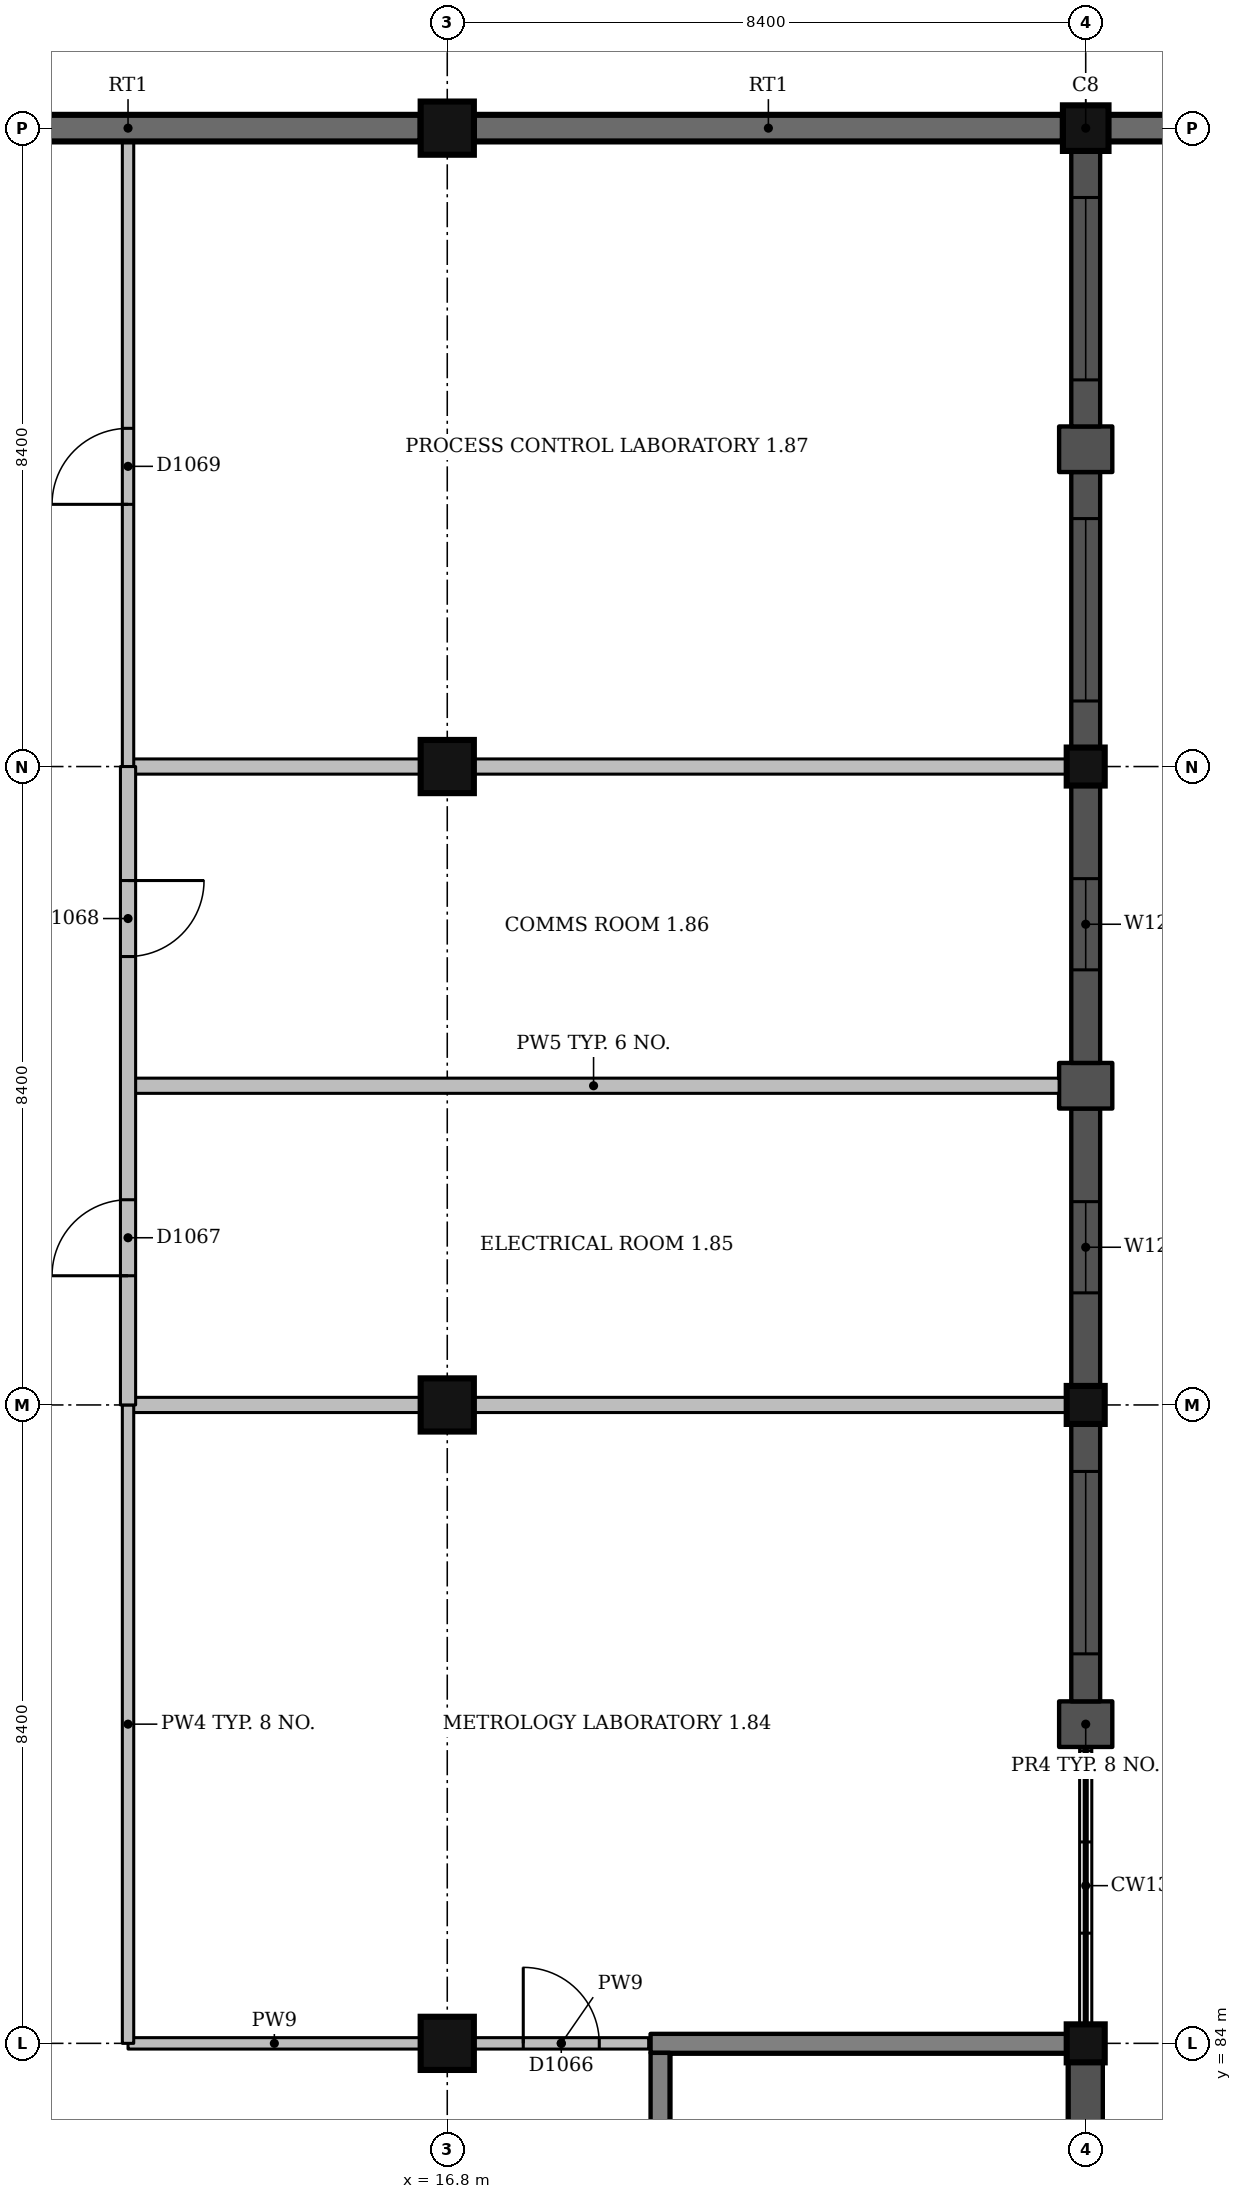
"""IFC4 building model, lengths in metres.
Left out: names, types, materials, properties, quantities, classifications, styles, units other than length and angle.
Written with IfcOpenShell. Run it as: python <this file> out.ifc"""

import sys

from ifc_helpers import new_model, si_unit, direction, frame, frame_2d, origin, origin_2d, place, context, subcontext, project, spatial, rectangle, extrude, element, fill, save


model = new_model("IFC4")
c1 = context("Model", 3, precision=1e-05, world=origin(), true_north=direction((0.0, 1.0)))
c2 = subcontext(c1, "Body", "Model", "MODEL_VIEW")
j1 = project(units=[si_unit("LENGTHUNIT", "METRE"), si_unit("PLANEANGLEUNIT", "RADIAN")], contexts=[c1])
p1 = place(None, origin())
s1 = spatial("IfcSite", under=j1, at=p1, CompositionType="ELEMENT")
p2 = place(p1, origin())
s2 = spatial("IfcBuilding", under=s1, at=p2, CompositionType="ELEMENT")
p3 = place(p2, frame((0.0, 0.0, 4.5)))
s3 = spatial("IfcBuildingStorey", under=s2, at=p3, CompositionType="ELEMENT", Elevation=4.5)
for number, where, z_axis, x_axis in (
    (1, (16.8, 84.0, -1.5), (0.0, 0.0, 1.0), (1.0, 0.0, 0.0)),
    (2, (16.8, 92.4, -1.5), (0.0, 0.0, 1.0), (1.0, 0.0, 0.0)),
    (3, (16.8, 100.8, -1.5), (0.0, 0.0, 1.0), (1.0, 0.0, 0.0)),
):
    element("IfcColumn", number, at=place(p3, frame(where, z_axis=z_axis, x_axis=x_axis)), inside=s3, PredefinedType="COLUMN", context=c2, shape_type="SweptSolid", body=[
        extrude(rectangle(XDim=0.7, YDim=0.7, at=origin_2d()), origin(), (0.0, 0.0, 1.0), 6.0),
    ])
p4 = place(p3, frame((16.8, 109.2, -0.25), z_axis=(0.0, 0.0, 1.0), x_axis=(1.0, 0.0, 0.0)))
e4 = element("IfcColumn", 4, at=p4, inside=s3, PredefinedType="COLUMN", context=c2, shape_type="SweptSolid", body=[
    extrude(rectangle(XDim=0.7, YDim=0.7, at=origin_2d()), origin(), (0.0, 0.0, 1.0), 4.75),
])
for number, where, z_axis, x_axis in (
    (5, (25.2, 84.0, -1.5), (0.0, 0.0, 1.0), (1.0, 0.0, 0.0)),
    (6, (25.2, 92.4, -1.5), (0.0, 0.0, 1.0), (1.0, 0.0, 0.0)),
    (7, (25.2, 100.8, -1.5), (0.0, 0.0, 1.0), (1.0, 0.0, 0.0)),
):
    element("IfcColumn", number, at=place(p3, frame(where, z_axis=z_axis, x_axis=x_axis)), inside=s3, PredefinedType="COLUMN", context=c2, shape_type="SweptSolid", body=[
        extrude(rectangle(XDim=0.5, YDim=0.5, at=origin_2d()), origin(), (0.0, 0.0, 1.0), 6.0),
    ])
p5 = place(p3, frame((25.2, 109.2, -0.25), z_axis=(0.0, 0.0, 1.0), x_axis=(1.0, 0.0, 0.0)))
e8 = element("IfcColumn", 8, at=p5, inside=s3, PredefinedType="COLUMN", context=c2, shape_type="SweptSolid", body=[
    extrude(rectangle(XDim=0.6, YDim=0.6, at=origin_2d()), origin(), (0.0, 0.0, 1.0), 4.75),
])
p6 = place(p3, frame((19.475, 84.0, 0.0), z_axis=(0.0, 0.0, 1.0), x_axis=(1.0, 0.0, 0.0)))
e9 = element("IfcWall", 9, at=p6, inside=s3, PredefinedType="SHEAR", context=c2, shape_type="SweptSolid", body=[
    extrude(rectangle(XDim=5.475, YDim=0.25, at=frame_2d((2.737, 0.0))), origin(), (0.0, 0.0, 1.0), 4.5),
])
p7 = place(p3, frame((19.6, 75.725, 0.0), z_axis=(0.0, 0.0, 1.0), x_axis=(0.0, 1.0, 0.0)))
e10 = element("IfcWall", 10, at=p7, inside=s3, PredefinedType="SHEAR", context=c2, shape_type="SweptSolid", body=[
    extrude(rectangle(XDim=8.15, YDim=0.25, at=frame_2d((4.075, 0.0))), origin(), (0.0, 0.0, 1.0), 4.5),
])
p8 = place(p3, frame((24.9, 109.2, -0.25), z_axis=(0.0, 0.0, 1.0), x_axis=(-1.0, 0.0, 0.0)))
e11 = element("IfcWall", 11, at=p8, inside=s3, PredefinedType="SOLIDWALL", context=c2, shape_type="SweptSolid", body=[
    extrude(rectangle(XDim=7.75, YDim=0.35, at=frame_2d((3.875, 0.0))), origin(), (0.0, 0.0, 1.0), 3.6),
])
p9 = place(p3, frame((16.45, 109.2, -0.25), z_axis=(0.0, 0.0, 1.0), x_axis=(-1.0, 0.0, 0.0)))
e12 = element("IfcWall", 12, at=p9, inside=s3, PredefinedType="SOLIDWALL", context=c2, shape_type="SweptSolid", body=[
    extrude(rectangle(XDim=7.7, YDim=0.35, at=frame_2d((3.85, 0.0))), origin(), (0.0, 0.0, 1.0), 3.6),
])
p10 = place(p3, frame((25.2, 109.2, 0.0), z_axis=(0.0, 0.0, 1.0), x_axis=(1.0, 0.0, 0.0)))
e13 = element("IfcWall", 13, at=p10, inside=s3, PredefinedType="SOLIDWALL", context=c2, shape_type="SweptSolid", body=[
    extrude(rectangle(XDim=67.2, YDim=0.35, at=frame_2d((33.6, 0.0))), origin(), (0.0, 0.0, 1.0), 4.25),
])
p11 = place(p3, frame((25.2, 80.1, 0.0), z_axis=(0.0, 0.0, 1.0), x_axis=(0.0, 1.0, 0.0)))
e14 = element("IfcWall", 14, at=p11, inside=s3, PredefinedType="SOLIDWALL", context=c2, shape_type="SweptSolid", body=[
    extrude(rectangle(XDim=3.65, YDim=0.45, at=frame_2d((1.825, 0.0))), origin(), (0.0, 0.0, 1.0), 3.65),
])
p12 = place(p3, frame((25.2, 87.9, 0.0), z_axis=(0.0, 0.0, 1.0), x_axis=(0.0, 1.0, 0.0)))
e15 = element("IfcWall", 15, at=p12, inside=s3, PredefinedType="SOLIDWALL", context=c2, shape_type="SweptSolid", body=[
    extrude(rectangle(XDim=0.6, YDim=0.7, at=frame_2d((0.3, 0.0))), origin(), (0.0, 0.0, 1.0), 3.35),
])
p13 = place(p3, frame((25.2, 88.5, 0.0), z_axis=(0.0, 0.0, 1.0), x_axis=(0.0, 1.0, 0.0)))
e16 = element("IfcWall", 16, at=p13, inside=s3, PredefinedType="SOLIDWALL", context=c2, shape_type="SweptSolid", body=[
    extrude(rectangle(XDim=3.65, YDim=0.38, at=frame_2d((1.825, 0.0))), origin(), (0.0, 0.0, 1.0), 3.35),
])
p14 = place(p13, frame((0.625, 0.0, 1.2)))
e17 = element("IfcOpeningElement", 17, at=p14, cuts=e16, PredefinedType="OPENING", context=c2, shape_type="SweptSolid", body=[
    extrude(rectangle(XDim=2.4, YDim=1.5, at=frame_2d((1.2, 0.75))), frame((0.0, 0.2, 0.0), z_axis=(0.0, -1.0, 0.0), x_axis=(1.0, 0.0, 0.0)), (0.0, 0.0, 1.0), 0.4),
])
p15 = place(p3, frame((25.2, 92.65, 0.0), z_axis=(0.0, 0.0, 1.0), x_axis=(0.0, 1.0, 0.0)))
e18 = element("IfcWall", 18, at=p15, inside=s3, PredefinedType="SOLIDWALL", context=c2, shape_type="SweptSolid", body=[
    extrude(rectangle(XDim=3.65, YDim=0.38, at=frame_2d((1.825, 0.0))), origin(), (0.0, 0.0, 1.0), 3.35),
])
p16 = place(p15, frame((1.225, 0.0, 2.4)))
e19 = element("IfcOpeningElement", 19, at=p16, cuts=e18, PredefinedType="OPENING", context=c2, shape_type="SweptSolid", body=[
    extrude(rectangle(XDim=1.2, YDim=0.6, at=frame_2d((0.6, 0.3))), frame((0.0, 0.2, 0.0), z_axis=(0.0, -1.0, 0.0), x_axis=(1.0, 0.0, 0.0)), (0.0, 0.0, 1.0), 0.4),
])
p17 = place(p3, frame((25.2, 96.3, 0.0), z_axis=(0.0, 0.0, 1.0), x_axis=(0.0, 1.0, 0.0)))
e20 = element("IfcWall", 20, at=p17, inside=s3, PredefinedType="SOLIDWALL", context=c2, shape_type="SweptSolid", body=[
    extrude(rectangle(XDim=0.6, YDim=0.7, at=frame_2d((0.3, 0.0))), origin(), (0.0, 0.0, 1.0), 3.35),
])
p18 = place(p3, frame((25.2, 96.9, 0.0), z_axis=(0.0, 0.0, 1.0), x_axis=(0.0, 1.0, 0.0)))
e21 = element("IfcWall", 21, at=p18, inside=s3, PredefinedType="SOLIDWALL", context=c2, shape_type="SweptSolid", body=[
    extrude(rectangle(XDim=3.65, YDim=0.38, at=frame_2d((1.825, 0.0))), origin(), (0.0, 0.0, 1.0), 3.35),
])
p19 = place(p18, frame((1.225, 0.0, 2.4)))
e22 = element("IfcOpeningElement", 22, at=p19, cuts=e21, PredefinedType="OPENING", context=c2, shape_type="SweptSolid", body=[
    extrude(rectangle(XDim=1.2, YDim=0.6, at=frame_2d((0.6, 0.3))), frame((0.0, 0.2, 0.0), z_axis=(0.0, -1.0, 0.0), x_axis=(1.0, 0.0, 0.0)), (0.0, 0.0, 1.0), 0.4),
])
p20 = place(p3, frame((25.2, 101.05, 0.0), z_axis=(0.0, 0.0, 1.0), x_axis=(0.0, 1.0, 0.0)))
e23 = element("IfcWall", 23, at=p20, inside=s3, PredefinedType="SOLIDWALL", context=c2, shape_type="SweptSolid", body=[
    extrude(rectangle(XDim=3.625, YDim=0.38, at=frame_2d((1.812, 0.0))), origin(), (0.0, 0.0, 1.0), 3.35),
])
p21 = place(p20, frame((0.613, 0.0, 1.2)))
e24 = element("IfcOpeningElement", 24, at=p21, cuts=e23, PredefinedType="OPENING", context=c2, shape_type="SweptSolid", body=[
    extrude(rectangle(XDim=2.4, YDim=1.5, at=frame_2d((1.2, 0.75))), frame((0.0, 0.2, 0.0), z_axis=(0.0, -1.0, 0.0), x_axis=(1.0, 0.0, 0.0)), (0.0, 0.0, 1.0), 0.4),
])
p22 = place(p3, frame((25.2, 104.675, 0.0), z_axis=(0.0, 0.0, 1.0), x_axis=(0.0, 1.0, 0.0)))
e25 = element("IfcWall", 25, at=p22, inside=s3, PredefinedType="SOLIDWALL", context=c2, shape_type="SweptSolid", body=[
    extrude(rectangle(XDim=0.6, YDim=0.7, at=frame_2d((0.3, 0.0))), origin(), (0.0, 0.0, 1.0), 3.35),
])
p23 = place(p3, frame((25.2, 105.275, 0.0), z_axis=(0.0, 0.0, 1.0), x_axis=(0.0, 1.0, 0.0)))
e26 = element("IfcWall", 26, at=p23, inside=s3, PredefinedType="SOLIDWALL", context=c2, shape_type="SweptSolid", body=[
    extrude(rectangle(XDim=3.625, YDim=0.38, at=frame_2d((1.812, 0.0))), origin(), (0.0, 0.0, 1.0), 3.35),
])
p24 = place(p23, frame((0.613, 0.0, 1.2)))
e27 = element("IfcOpeningElement", 27, at=p24, cuts=e26, PredefinedType="OPENING", context=c2, shape_type="SweptSolid", body=[
    extrude(rectangle(XDim=2.4, YDim=1.5, at=frame_2d((1.2, 0.75))), frame((0.0, 0.2, 0.0), z_axis=(0.0, -1.0, 0.0), x_axis=(1.0, 0.0, 0.0)), (0.0, 0.0, 1.0), 0.4),
])
p25 = place(p3, frame((12.6, 84.0, 0.0), z_axis=(0.0, 0.0, 1.0), x_axis=(1.0, 0.0, 0.0)))
e28 = element("IfcWall", 28, at=p25, inside=s3, PredefinedType="PARTITIONING", context=c2, shape_type="SweptSolid", body=[
    extrude(rectangle(XDim=3.85, YDim=0.15, at=frame_2d((1.925, 0.0))), origin(), (0.0, 0.0, 1.0), 3.4),
])
p26 = place(p3, frame((17.15, 84.0, 0.0), z_axis=(0.0, 0.0, 1.0), x_axis=(1.0, 0.0, 0.0)))
e29 = element("IfcWall", 29, at=p26, inside=s3, PredefinedType="PARTITIONING", context=c2, shape_type="SweptSolid", body=[
    extrude(rectangle(XDim=2.3, YDim=0.15, at=frame_2d((1.15, 0.0))), origin(), (0.0, 0.0, 1.0), 3.5),
])
p27 = place(p26, frame((0.65, 0.0, 0.0)))
e30 = element("IfcOpeningElement", 30, at=p27, cuts=e29, PredefinedType="OPENING", context=c2, shape_type="SweptSolid", body=[
    extrude(rectangle(XDim=1.0, YDim=2.1, at=frame_2d((0.5, 1.05))), frame((0.0, 0.085, 0.0), z_axis=(0.0, -1.0, 0.0), x_axis=(1.0, 0.0, 0.0)), (0.0, 0.0, 1.0), 0.17),
])
p28 = place(p3, frame((12.6, 92.4, 0.0), z_axis=(0.0, 0.0, 1.0), x_axis=(1.0, 0.0, 0.0)))
e31 = element("IfcWall", 31, at=p28, inside=s3, PredefinedType="PARTITIONING", context=c2, shape_type="SweptSolid", body=[
    extrude(rectangle(XDim=3.85, YDim=0.2, at=frame_2d((1.925, 0.0))), origin(), (0.0, 0.0, 1.0), 3.4),
])
p29 = place(p3, frame((17.15, 92.4, 0.0), z_axis=(0.0, 0.0, 1.0), x_axis=(1.0, 0.0, 0.0)))
e32 = element("IfcWall", 32, at=p29, inside=s3, PredefinedType="PARTITIONING", context=c2, shape_type="SweptSolid", body=[
    extrude(rectangle(XDim=7.8, YDim=0.2, at=frame_2d((3.9, 0.0))), origin(), (0.0, 0.0, 1.0), 3.4),
])
p30 = place(p3, frame((12.6, 96.6, 0.0), z_axis=(0.0, 0.0, 1.0), x_axis=(1.0, 0.0, 0.0)))
e33 = element("IfcWall", 33, at=p30, inside=s3, PredefinedType="PARTITIONING", context=c2, shape_type="SweptSolid", body=[
    extrude(rectangle(XDim=12.25, YDim=0.2, at=frame_2d((6.125, 0.0))), origin(), (0.0, 0.0, 1.0), 3.4),
])
p31 = place(p3, frame((12.6, 100.8, 0.0), z_axis=(0.0, 0.0, 1.0), x_axis=(1.0, 0.0, 0.0)))
e34 = element("IfcWall", 34, at=p31, inside=s3, PredefinedType="PARTITIONING", context=c2, shape_type="SweptSolid", body=[
    extrude(rectangle(XDim=3.85, YDim=0.2, at=frame_2d((1.925, 0.0))), origin(), (0.0, 0.0, 1.0), 3.4),
])
p32 = place(p3, frame((17.15, 100.8, 0.0), z_axis=(0.0, 0.0, 1.0), x_axis=(1.0, 0.0, 0.0)))
e35 = element("IfcWall", 35, at=p32, inside=s3, PredefinedType="PARTITIONING", context=c2, shape_type="SweptSolid", body=[
    extrude(rectangle(XDim=7.8, YDim=0.2, at=frame_2d((3.9, 0.0))), origin(), (0.0, 0.0, 1.0), 3.4),
])
p33 = place(p3, frame((12.6, 84.0, 0.0), z_axis=(0.0, 0.0, 1.0), x_axis=(0.0, 1.0, 0.0)))
e36 = element("IfcWall", 36, at=p33, inside=s3, PredefinedType="PARTITIONING", context=c2, shape_type="SweptSolid", body=[
    extrude(rectangle(XDim=8.4, YDim=0.15, at=frame_2d((4.2, 0.0))), origin(), (0.0, 0.0, 1.0), 3.4),
])
p34 = place(p3, frame((12.6, 100.8, 0.0), z_axis=(0.0, 0.0, 1.0), x_axis=(0.0, 1.0, 0.0)))
e37 = element("IfcWall", 37, at=p34, inside=s3, PredefinedType="PARTITIONING", context=c2, shape_type="SweptSolid", body=[
    extrude(rectangle(XDim=8.225, YDim=0.15, at=frame_2d((4.112, 0.0))), origin(), (0.0, 0.0, 1.0), 3.4),
])
p35 = place(p34, frame((3.45, 0.0, 0.0)))
e38 = element("IfcOpeningElement", 38, at=p35, cuts=e37, PredefinedType="OPENING", context=c2, shape_type="SweptSolid", body=[
    extrude(rectangle(XDim=1.0, YDim=2.1, at=frame_2d((0.5, 1.05))), frame((0.0, 0.085, 0.0), z_axis=(0.0, -1.0, 0.0), x_axis=(1.0, 0.0, 0.0)), (0.0, 0.0, 1.0), 0.17),
])
p36 = place(p3, frame((12.6, 92.4, 0.0), z_axis=(0.0, 0.0, 1.0), x_axis=(0.0, 1.0, 0.0)))
e39 = element("IfcWall", 39, at=p36, inside=s3, PredefinedType="PARTITIONING", context=c2, shape_type="SweptSolid", body=[
    extrude(rectangle(XDim=8.4, YDim=0.2, at=frame_2d((4.2, 0.0))), origin(), (0.0, 0.0, 1.0), 3.4),
])
p37 = place(p36, frame((1.7, 0.0, 0.0)))
e40 = element("IfcOpeningElement", 40, at=p37, cuts=e39, PredefinedType="OPENING", context=c2, shape_type="SweptSolid", body=[
    extrude(rectangle(XDim=1.0, YDim=2.1, at=frame_2d((0.5, 1.05))), frame((0.0, 0.11, 0.0), z_axis=(0.0, -1.0, 0.0), x_axis=(1.0, 0.0, 0.0)), (0.0, 0.0, 1.0), 0.22),
])
p38 = place(p36, frame((5.9, 0.0, 0.0)))
e41 = element("IfcOpeningElement", 41, at=p38, cuts=e39, PredefinedType="OPENING", context=c2, shape_type="SweptSolid", body=[
    extrude(rectangle(XDim=1.0, YDim=2.1, at=frame_2d((0.5, 1.05))), frame((0.0, 0.11, 0.0), z_axis=(0.0, -1.0, 0.0), x_axis=(1.0, 0.0, 0.0)), (0.0, 0.0, 1.0), 0.22),
])
p39 = place(p14, origin())
e42 = element("IfcWindow", 42, at=p39, inside=s3, PartitioningType="SINGLE_PANEL", PredefinedType="WINDOW", context=c2, shape_type="SweptSolid", body=[
    extrude(rectangle(XDim=2.4, YDim=1.5, at=frame_2d((1.2, 0.75))), frame((0.0, 0.15, 0.0), z_axis=(0.0, -1.0, 0.0), x_axis=(1.0, 0.0, 0.0)), (0.0, 0.0, 1.0), 0.06),
])
fill(e17, e42)
p40 = place(p16, origin())
e43 = element("IfcWindow", 43, at=p40, inside=s3, PartitioningType="SINGLE_PANEL", PredefinedType="WINDOW", context=c2, shape_type="SweptSolid", body=[
    extrude(rectangle(XDim=1.2, YDim=0.6, at=frame_2d((0.6, 0.3))), frame((0.0, 0.15, 0.0), z_axis=(0.0, -1.0, 0.0), x_axis=(1.0, 0.0, 0.0)), (0.0, 0.0, 1.0), 0.06),
])
fill(e19, e43)
p41 = place(p19, origin())
e44 = element("IfcWindow", 44, at=p41, inside=s3, PartitioningType="SINGLE_PANEL", PredefinedType="WINDOW", context=c2, shape_type="SweptSolid", body=[
    extrude(rectangle(XDim=1.2, YDim=0.6, at=frame_2d((0.6, 0.3))), frame((0.0, 0.15, 0.0), z_axis=(0.0, -1.0, 0.0), x_axis=(1.0, 0.0, 0.0)), (0.0, 0.0, 1.0), 0.06),
])
fill(e22, e44)
p42 = place(p21, origin())
e45 = element("IfcWindow", 45, at=p42, inside=s3, PartitioningType="SINGLE_PANEL", PredefinedType="WINDOW", context=c2, shape_type="SweptSolid", body=[
    extrude(rectangle(XDim=2.4, YDim=1.5, at=frame_2d((1.2, 0.75))), frame((0.0, 0.15, 0.0), z_axis=(0.0, -1.0, 0.0), x_axis=(1.0, 0.0, 0.0)), (0.0, 0.0, 1.0), 0.06),
])
fill(e24, e45)
p43 = place(p24, origin())
e46 = element("IfcWindow", 46, at=p43, inside=s3, PartitioningType="SINGLE_PANEL", PredefinedType="WINDOW", context=c2, shape_type="SweptSolid", body=[
    extrude(rectangle(XDim=2.4, YDim=1.5, at=frame_2d((1.2, 0.75))), frame((0.0, 0.15, 0.0), z_axis=(0.0, -1.0, 0.0), x_axis=(1.0, 0.0, 0.0)), (0.0, 0.0, 1.0), 0.06),
])
fill(e27, e46)
p44 = place(p27, origin())
e47 = element("IfcDoor", 47, at=p44, inside=s3, OperationType="SINGLE_SWING_LEFT", PredefinedType="DOOR", context=c2, shape_type="SweptSolid", body=[
    extrude(rectangle(XDim=1.0, YDim=2.1, at=frame_2d((0.5, 1.05))), frame((0.0, 0.025, 0.0), z_axis=(0.0, -1.0, 0.0), x_axis=(1.0, 0.0, 0.0)), (0.0, 0.0, 1.0), 0.05),
])
fill(e30, e47)
p45 = place(p37, origin())
e48 = element("IfcDoor", 48, at=p45, inside=s3, OperationType="SINGLE_SWING_LEFT", PredefinedType="DOOR", context=c2, shape_type="SweptSolid", body=[
    extrude(rectangle(XDim=1.0, YDim=2.1, at=frame_2d((0.5, 1.05))), frame((0.0, 0.025, 0.0), z_axis=(0.0, -1.0, 0.0), x_axis=(1.0, 0.0, 0.0)), (0.0, 0.0, 1.0), 0.05),
])
fill(e40, e48)
p46 = place(p38, origin())
e49 = element("IfcDoor", 49, at=p46, inside=s3, OperationType="SINGLE_SWING_RIGHT", PredefinedType="DOOR", context=c2, shape_type="SweptSolid", body=[
    extrude(rectangle(XDim=1.0, YDim=2.1, at=frame_2d((0.5, 1.05))), frame((0.0, 0.025, 0.0), z_axis=(0.0, -1.0, 0.0), x_axis=(1.0, 0.0, 0.0)), (0.0, 0.0, 1.0), 0.05),
])
fill(e41, e49)
p47 = place(p35, origin())
e50 = element("IfcDoor", 50, at=p47, inside=s3, OperationType="SINGLE_SWING_LEFT", PredefinedType="DOOR", context=c2, shape_type="SweptSolid", body=[
    extrude(rectangle(XDim=1.0, YDim=2.1, at=frame_2d((0.5, 1.05))), frame((0.0, 0.025, 0.0), z_axis=(0.0, -1.0, 0.0), x_axis=(1.0, 0.0, 0.0)), (0.0, 0.0, 1.0), 0.05),
])
fill(e38, e50)
save(model, sys.argv[1])
